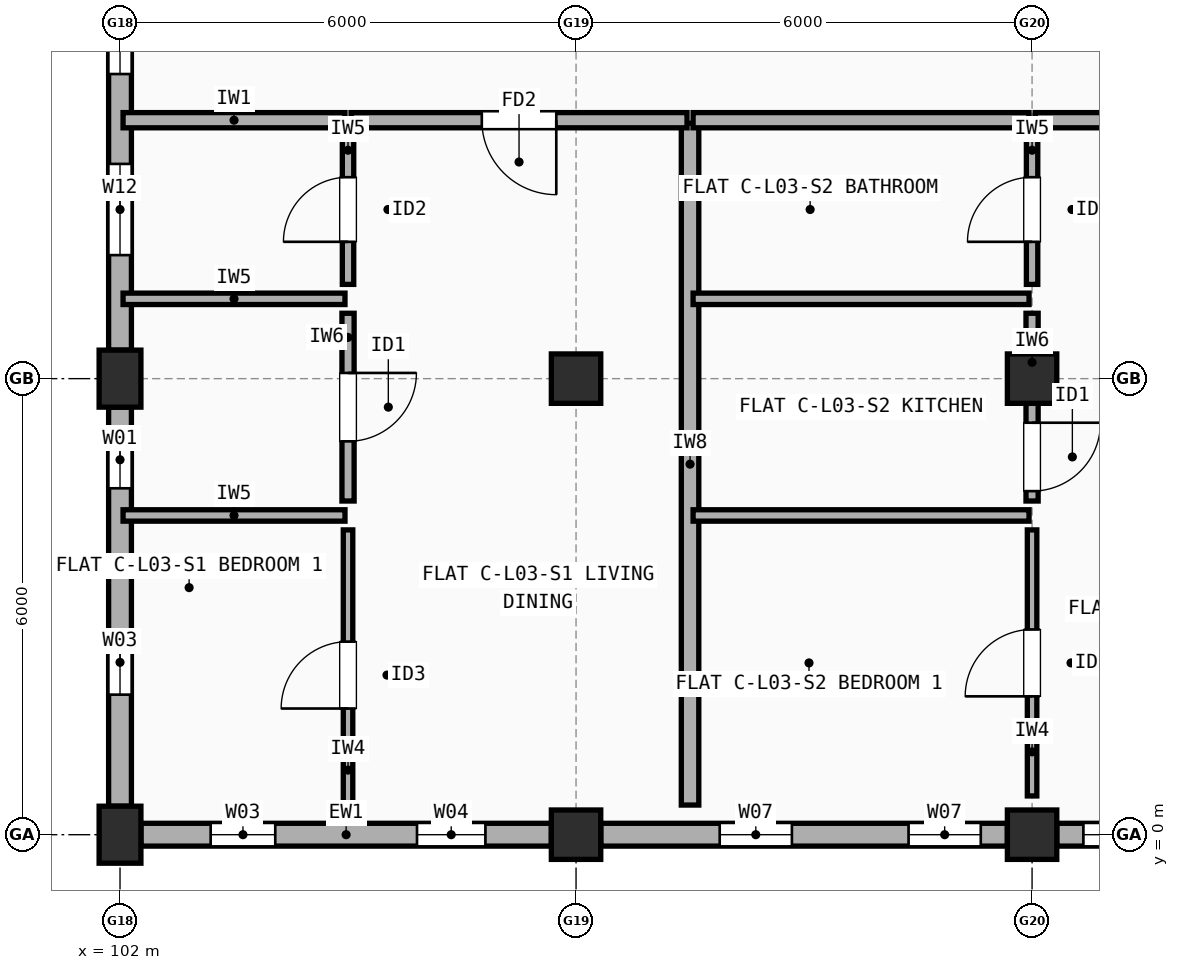
"""IFC4 building model, lengths in metres.
Left out: names, types, materials, properties, quantities, classifications, styles, units other than length and angle.
Written with IfcOpenShell. Run it as: python <this file> out.ifc"""

import sys

from ifc_helpers import new_model, si_unit, direction, frame, frame_2d, origin, origin_2d, place, context, subcontext, project, spatial, rectangle, extrude, element, fill, save


model = new_model("IFC4")
c1 = context("Model", 3, precision=1e-05, world=origin(), true_north=direction((0.0, 1.0)))
c2 = subcontext(c1, "Body", "Model", "MODEL_VIEW")
j1 = project(units=[si_unit("LENGTHUNIT", "METRE"), si_unit("PLANEANGLEUNIT", "RADIAN")], contexts=[c1])
p1 = place(None, origin())
s1 = spatial("IfcSite", under=j1, at=p1, CompositionType="ELEMENT")
p2 = place(p1, origin())
s2 = spatial("IfcBuilding", under=s1, at=p2, CompositionType="ELEMENT")
p3 = place(p2, frame((0.0, 0.0, 10.9)))
s3 = spatial("IfcBuildingStorey", under=s2, at=p3, CompositionType="ELEMENT", Elevation=10.9)
for number, where, z_axis, x_axis in (
    (1, (102.0, 0.0, 0.0), (0.0, 0.0, 1.0), (1.0, 0.0, 0.0)),
    (2, (102.0, 6.0, 0.0), (0.0, 0.0, 1.0), (1.0, 0.0, 0.0)),
):
    element("IfcColumn", number, at=place(p3, frame(where, z_axis=z_axis, x_axis=x_axis)), inside=s3, PredefinedType="COLUMN", context=c2, shape_type="SweptSolid", body=[
        extrude(rectangle(XDim=0.55, YDim=0.75, at=origin_2d()), origin(), (0.0, 0.0, 1.0), 2.96),
    ])
for number, where, z_axis, x_axis in (
    (3, (108.0, 0.0, 0.0), (0.0, 0.0, 1.0), (1.0, 0.0, 0.0)),
    (4, (108.0, 6.0, 0.0), (0.0, 0.0, 1.0), (1.0, 0.0, 0.0)),
    (5, (114.0, 0.0, 0.0), (0.0, 0.0, 1.0), (1.0, 0.0, 0.0)),
    (6, (114.0, 6.0, 0.0), (0.0, 0.0, 1.0), (1.0, 0.0, 0.0)),
):
    element("IfcColumn", number, at=place(p3, frame(where, z_axis=z_axis, x_axis=x_axis)), inside=s3, PredefinedType="COLUMN", context=c2, shape_type="SweptSolid", body=[
        extrude(rectangle(XDim=0.65, YDim=0.65, at=origin_2d()), origin(), (0.0, 0.0, 1.0), 2.96),
    ])
p4 = place(p3, frame((102.275, 0.0, 0.0), z_axis=(0.0, 0.0, 1.0), x_axis=(1.0, 0.0, 0.0)))
e7 = element("IfcWall", 7, at=p4, inside=s3, PredefinedType="STANDARD", context=c2, shape_type="SweptSolid", body=[
    extrude(rectangle(XDim=5.4, YDim=0.3, at=frame_2d((2.7, 0.0))), origin(), (0.0, 0.0, 1.0), 2.442),
])
p5 = place(p4, frame((0.917, 0.0, 0.9)))
e8 = element("IfcOpeningElement", 8, at=p5, cuts=e7, PredefinedType="OPENING", context=c2, shape_type="SweptSolid", body=[
    extrude(rectangle(XDim=0.85, YDim=1.25, at=frame_2d((0.425, 0.625))), frame((0.0, 0.16, 0.0), z_axis=(0.0, -1.0, 0.0), x_axis=(1.0, 0.0, 0.0)), (0.0, 0.0, 1.0), 0.32),
])
p6 = place(p4, frame((3.633, 0.0, 0.9)))
e9 = element("IfcOpeningElement", 9, at=p6, cuts=e7, PredefinedType="OPENING", context=c2, shape_type="SweptSolid", body=[
    extrude(rectangle(XDim=0.9, YDim=1.3, at=frame_2d((0.45, 0.65))), frame((0.0, 0.16, 0.0), z_axis=(0.0, -1.0, 0.0), x_axis=(1.0, 0.0, 0.0)), (0.0, 0.0, 1.0), 0.32),
])
p7 = place(p3, frame((108.325, 0.0, 0.0), z_axis=(0.0, 0.0, 1.0), x_axis=(1.0, 0.0, 0.0)))
e10 = element("IfcWall", 10, at=p7, inside=s3, PredefinedType="STANDARD", context=c2, shape_type="SweptSolid", body=[
    extrude(rectangle(XDim=5.35, YDim=0.3, at=frame_2d((2.675, 0.0))), origin(), (0.0, 0.0, 1.0), 2.442),
])
p8 = place(p7, frame((1.565, 0.0, 0.9)))
e11 = element("IfcOpeningElement", 11, at=p8, cuts=e10, PredefinedType="OPENING", context=c2, shape_type="SweptSolid", body=[
    extrude(rectangle(XDim=0.95, YDim=1.35, at=frame_2d((0.475, 0.675))), frame((0.0, 0.16, 0.0), z_axis=(0.0, -1.0, 0.0), x_axis=(1.0, 0.0, 0.0)), (0.0, 0.0, 1.0), 0.32),
])
p9 = place(p7, frame((4.05, 0.0, 0.9)))
e12 = element("IfcOpeningElement", 12, at=p9, cuts=e10, PredefinedType="OPENING", context=c2, shape_type="SweptSolid", body=[
    extrude(rectangle(XDim=0.95, YDim=1.35, at=frame_2d((0.475, 0.675))), frame((0.0, 0.16, 0.0), z_axis=(0.0, -1.0, 0.0), x_axis=(1.0, 0.0, 0.0)), (0.0, 0.0, 1.0), 0.32),
])
p10 = place(p3, frame((114.325, 0.0, 0.0), z_axis=(0.0, 0.0, 1.0), x_axis=(1.0, 0.0, 0.0)))
e13 = element("IfcWall", 13, at=p10, inside=s3, PredefinedType="STANDARD", context=c2, shape_type="SweptSolid", body=[
    extrude(rectangle(XDim=5.35, YDim=0.3, at=frame_2d((2.675, 0.0))), origin(), (0.0, 0.0, 1.0), 2.442),
])
p11 = place(p10, frame((0.35, 0.0, 0.9)))
e14 = element("IfcOpeningElement", 14, at=p11, cuts=e13, PredefinedType="OPENING", context=c2, shape_type="SweptSolid", body=[
    extrude(rectangle(XDim=1.2, YDim=1.35, at=frame_2d((0.6, 0.675))), frame((0.0, 0.16, 0.0), z_axis=(0.0, -1.0, 0.0), x_axis=(1.0, 0.0, 0.0)), (0.0, 0.0, 1.0), 0.32),
])
p12 = place(p10, frame((2.585, 0.0, 0.9)))
e15 = element("IfcOpeningElement", 15, at=p12, cuts=e13, PredefinedType="OPENING", context=c2, shape_type="SweptSolid", body=[
    extrude(rectangle(XDim=1.2, YDim=1.35, at=frame_2d((0.6, 0.675))), frame((0.0, 0.16, 0.0), z_axis=(0.0, -1.0, 0.0), x_axis=(1.0, 0.0, 0.0)), (0.0, 0.0, 1.0), 0.32),
])
p13 = place(p3, frame((102.0, 11.625, 0.0), z_axis=(0.0, 0.0, 1.0), x_axis=(0.0, -1.0, 0.0)))
e16 = element("IfcWall", 16, at=p13, inside=s3, PredefinedType="STANDARD", context=c2, shape_type="SweptSolid", body=[
    extrude(rectangle(XDim=5.25, YDim=0.3, at=frame_2d((2.625, 0.0))), origin(), (0.0, 0.0, 1.0), 2.442),
])
p14 = place(p13, frame((0.567, 0.0, 0.9)))
e17 = element("IfcOpeningElement", 17, at=p14, cuts=e16, PredefinedType="OPENING", context=c2, shape_type="SweptSolid", body=[
    extrude(rectangle(XDim=1.05, YDim=1.35, at=frame_2d((0.525, 0.675))), frame((0.0, 0.16, 0.0), z_axis=(0.0, -1.0, 0.0), x_axis=(1.0, 0.0, 0.0)), (0.0, 0.0, 1.0), 0.32),
])
p15 = place(p13, frame((2.8, 0.0, 0.9)))
e18 = element("IfcOpeningElement", 18, at=p15, cuts=e16, PredefinedType="OPENING", context=c2, shape_type="SweptSolid", body=[
    extrude(rectangle(XDim=1.2, YDim=1.35, at=frame_2d((0.6, 0.675))), frame((0.0, 0.16, 0.0), z_axis=(0.0, -1.0, 0.0), x_axis=(1.0, 0.0, 0.0)), (0.0, 0.0, 1.0), 0.32),
])
p16 = place(p3, frame((102.0, 5.625, 0.0), z_axis=(0.0, 0.0, 1.0), x_axis=(0.0, -1.0, 0.0)))
e19 = element("IfcWall", 19, at=p16, inside=s3, PredefinedType="STANDARD", context=c2, shape_type="SweptSolid", body=[
    extrude(rectangle(XDim=5.25, YDim=0.3, at=frame_2d((2.625, 0.0))), origin(), (0.0, 0.0, 1.0), 2.442),
])
p17 = place(p16, frame((0.317, 0.0, 0.9)))
e20 = element("IfcOpeningElement", 20, at=p17, cuts=e19, PredefinedType="OPENING", context=c2, shape_type="SweptSolid", body=[
    extrude(rectangle(XDim=0.75, YDim=1.15, at=frame_2d((0.375, 0.575))), frame((0.0, 0.16, 0.0), z_axis=(0.0, -1.0, 0.0), x_axis=(1.0, 0.0, 0.0)), (0.0, 0.0, 1.0), 0.32),
])
p18 = place(p16, frame((2.933, 0.0, 0.9)))
e21 = element("IfcOpeningElement", 21, at=p18, cuts=e19, PredefinedType="OPENING", context=c2, shape_type="SweptSolid", body=[
    extrude(rectangle(XDim=0.85, YDim=1.25, at=frame_2d((0.425, 0.625))), frame((0.0, 0.16, 0.0), z_axis=(0.0, -1.0, 0.0), x_axis=(1.0, 0.0, 0.0)), (0.0, 0.0, 1.0), 0.32),
])
p19 = place(p3, frame((109.5, 0.39, 0.0), z_axis=(0.0, 0.0, 1.0), x_axis=(0.0, 1.0, 0.0)))
e22 = element("IfcWall", 22, at=p19, inside=s3, PredefinedType="SOLIDWALL", context=c2, shape_type="SweptSolid", body=[
    extrude(rectangle(XDim=8.97, YDim=0.23, at=frame_2d((4.485, 0.0))), origin(), (0.0, 0.0, 1.0), 2.442),
])
p20 = place(p3, frame((102.04, 9.4, 0.0), z_axis=(0.0, 0.0, 1.0), x_axis=(1.0, 0.0, 0.0)))
e23 = element("IfcWall", 23, at=p20, inside=s3, PredefinedType="SOLIDWALL", context=c2, shape_type="SweptSolid", body=[
    extrude(rectangle(XDim=2.92, YDim=0.2, at=frame_2d((1.46, 0.0))), origin(), (0.0, 0.0, 1.0), 2.442),
])
p21 = place(p3, frame((105.04, 9.4, 0.0), z_axis=(0.0, 0.0, 1.0), x_axis=(1.0, 0.0, 0.0)))
e24 = element("IfcWall", 24, at=p21, inside=s3, PredefinedType="SOLIDWALL", context=c2, shape_type="SweptSolid", body=[
    extrude(rectangle(XDim=4.42, YDim=0.2, at=frame_2d((2.21, 0.0))), origin(), (0.0, 0.0, 1.0), 2.458),
])
p22 = place(p21, frame((1.72, 0.0, 0.0)))
e25 = element("IfcOpeningElement", 25, at=p22, cuts=e24, PredefinedType="OPENING", context=c2, shape_type="SweptSolid", body=[
    extrude(rectangle(XDim=0.98, YDim=2.15, at=frame_2d((0.49, 1.075))), frame((0.0, 0.11, 0.0), z_axis=(0.0, -1.0, 0.0), x_axis=(1.0, 0.0, 0.0)), (0.0, 0.0, 1.0), 0.22),
])
p23 = place(p3, frame((105.0, 0.19, 0.0), z_axis=(0.0, 0.0, 1.0), x_axis=(0.0, 1.0, 0.0)))
e26 = element("IfcWall", 26, at=p23, inside=s3, PredefinedType="PARTITIONING", context=c2, shape_type="SweptSolid", body=[
    extrude(rectangle(XDim=3.82, YDim=0.125, at=frame_2d((1.91, 0.0))), origin(), (0.0, 0.0, 1.0), 2.96),
])
p24 = place(p23, frame((1.47, 0.0, 0.0)))
e27 = element("IfcOpeningElement", 27, at=p24, cuts=e26, PredefinedType="OPENING", context=c2, shape_type="SweptSolid", body=[
    extrude(rectangle(XDim=0.88, YDim=2.1, at=frame_2d((0.44, 1.05))), frame((0.0, 0.073, 0.0), z_axis=(0.0, -1.0, 0.0), x_axis=(1.0, 0.0, 0.0)), (0.0, 0.0, 1.0), 0.145),
])
p25 = place(p3, frame((105.0, 4.39, 0.0), z_axis=(0.0, 0.0, 1.0), x_axis=(0.0, 1.0, 0.0)))
e28 = element("IfcWall", 28, at=p25, inside=s3, PredefinedType="PLUMBINGWALL", context=c2, shape_type="SweptSolid", body=[
    extrude(rectangle(XDim=2.47, YDim=0.16, at=frame_2d((1.235, 0.0))), origin(), (0.0, 0.0, 1.0), 2.442),
])
p26 = place(p25, frame((0.785, 0.0, 0.0)))
e29 = element("IfcOpeningElement", 29, at=p26, cuts=e28, PredefinedType="OPENING", context=c2, shape_type="SweptSolid", body=[
    extrude(rectangle(XDim=0.9, YDim=2.1, at=frame_2d((0.45, 1.05))), frame((0.0, 0.09, 0.0), z_axis=(0.0, -1.0, 0.0), x_axis=(1.0, 0.0, 0.0)), (0.0, 0.0, 1.0), 0.18),
])
p27 = place(p3, frame((105.0, 7.24, 0.0), z_axis=(0.0, 0.0, 1.0), x_axis=(0.0, 1.0, 0.0)))
e30 = element("IfcWall", 30, at=p27, inside=s3, PredefinedType="PARTITIONING", context=c2, shape_type="SweptSolid", body=[
    extrude(rectangle(XDim=1.97, YDim=0.15, at=frame_2d((0.985, 0.0))), origin(), (0.0, 0.0, 1.0), 2.96),
])
p28 = place(p27, frame((0.56, 0.0, 0.0)))
e31 = element("IfcOpeningElement", 31, at=p28, cuts=e30, PredefinedType="OPENING", context=c2, shape_type="SweptSolid", body=[
    extrude(rectangle(XDim=0.85, YDim=2.1, at=frame_2d((0.425, 1.05))), frame((0.0, 0.085, 0.0), z_axis=(0.0, -1.0, 0.0), x_axis=(1.0, 0.0, 0.0)), (0.0, 0.0, 1.0), 0.17),
])
for number, where, z_axis, x_axis in (
    (32, (102.04, 4.2, 0.0), (0.0, 0.0, 1.0), (1.0, 0.0, 0.0)),
    (33, (102.04, 7.05, 0.0), (0.0, 0.0, 1.0), (1.0, 0.0, 0.0)),
):
    element("IfcWall", number, at=place(p3, frame(where, z_axis=z_axis, x_axis=x_axis)), inside=s3, PredefinedType="PARTITIONING", context=c2, shape_type="SweptSolid", body=[
        extrude(rectangle(XDim=2.92, YDim=0.15, at=frame_2d((1.46, 0.0))), origin(), (0.0, 0.0, 1.0), 2.442),
    ])
p29 = place(p3, frame((109.54, 9.4, 0.0), z_axis=(0.0, 0.0, 1.0), x_axis=(1.0, 0.0, 0.0)))
e34 = element("IfcWall", 34, at=p29, inside=s3, PredefinedType="SOLIDWALL", context=c2, shape_type="SweptSolid", body=[
    extrude(rectangle(XDim=4.42, YDim=0.2, at=frame_2d((2.21, 0.0))), origin(), (0.0, 0.0, 1.0), 2.548),
])
p30 = place(p3, frame((114.04, 9.4, 0.0), z_axis=(0.0, 0.0, 1.0), x_axis=(1.0, 0.0, 0.0)))
e35 = element("IfcWall", 35, at=p30, inside=s3, PredefinedType="SOLIDWALL", context=c2, shape_type="SweptSolid", body=[
    extrude(rectangle(XDim=4.42, YDim=0.2, at=frame_2d((2.21, 0.0))), origin(), (0.0, 0.0, 1.0), 2.548),
])
p31 = place(p30, frame((1.685, 0.0, 0.0)))
e36 = element("IfcOpeningElement", 36, at=p31, cuts=e35, PredefinedType="OPENING", context=c2, shape_type="SweptSolid", body=[
    extrude(rectangle(XDim=1.05, YDim=2.15, at=frame_2d((0.525, 1.075))), frame((0.0, 0.11, 0.0), z_axis=(0.0, -1.0, 0.0), x_axis=(1.0, 0.0, 0.0)), (0.0, 0.0, 1.0), 0.22),
])
p32 = place(p3, frame((114.0, 0.51, 0.0), z_axis=(0.0, 0.0, 1.0), x_axis=(0.0, 1.0, 0.0)))
e37 = element("IfcWall", 37, at=p32, inside=s3, PredefinedType="PARTITIONING", context=c2, shape_type="SweptSolid", body=[
    extrude(rectangle(XDim=3.5, YDim=0.125, at=frame_2d((1.75, 0.0))), origin(), (0.0, 0.0, 1.0), 2.458),
])
p33 = place(p32, frame((1.31, 0.0, 0.0)))
e38 = element("IfcOpeningElement", 38, at=p33, cuts=e37, PredefinedType="OPENING", context=c2, shape_type="SweptSolid", body=[
    extrude(rectangle(XDim=0.88, YDim=2.1, at=frame_2d((0.44, 1.05))), frame((0.0, 0.073, 0.0), z_axis=(0.0, -1.0, 0.0), x_axis=(1.0, 0.0, 0.0)), (0.0, 0.0, 1.0), 0.145),
])
p34 = place(p3, frame((114.0, 4.39, 0.0), z_axis=(0.0, 0.0, 1.0), x_axis=(0.0, 1.0, 0.0)))
e39 = element("IfcWall", 39, at=p34, inside=s3, PredefinedType="PLUMBINGWALL", context=c2, shape_type="SweptSolid", body=[
    extrude(rectangle(XDim=2.47, YDim=0.16, at=frame_2d((1.235, 0.0))), origin(), (0.0, 0.0, 1.0), 2.458),
])
p35 = place(p34, frame((0.13, 0.0, 0.0)))
e40 = element("IfcOpeningElement", 40, at=p35, cuts=e39, PredefinedType="OPENING", context=c2, shape_type="SweptSolid", body=[
    extrude(rectangle(XDim=0.9, YDim=2.1, at=frame_2d((0.45, 1.05))), frame((0.0, 0.09, 0.0), z_axis=(0.0, -1.0, 0.0), x_axis=(1.0, 0.0, 0.0)), (0.0, 0.0, 1.0), 0.18),
])
p36 = place(p3, frame((114.0, 7.24, 0.0), z_axis=(0.0, 0.0, 1.0), x_axis=(0.0, 1.0, 0.0)))
e41 = element("IfcWall", 41, at=p36, inside=s3, PredefinedType="PARTITIONING", context=c2, shape_type="SweptSolid", body=[
    extrude(rectangle(XDim=1.97, YDim=0.15, at=frame_2d((0.985, 0.0))), origin(), (0.0, 0.0, 1.0), 2.548),
])
p37 = place(p36, frame((0.56, 0.0, 0.0)))
e42 = element("IfcOpeningElement", 42, at=p37, cuts=e41, PredefinedType="OPENING", context=c2, shape_type="SweptSolid", body=[
    extrude(rectangle(XDim=0.85, YDim=2.1, at=frame_2d((0.425, 1.05))), frame((0.0, 0.085, 0.0), z_axis=(0.0, -1.0, 0.0), x_axis=(1.0, 0.0, 0.0)), (0.0, 0.0, 1.0), 0.17),
])
p38 = place(p3, frame((109.54, 4.2, 0.0), z_axis=(0.0, 0.0, 1.0), x_axis=(1.0, 0.0, 0.0)))
e43 = element("IfcWall", 43, at=p38, inside=s3, PredefinedType="PARTITIONING", context=c2, shape_type="SweptSolid", body=[
    extrude(rectangle(XDim=4.42, YDim=0.15, at=frame_2d((2.21, 0.0))), origin(), (0.0, 0.0, 1.0), 2.458),
])
p39 = place(p3, frame((109.54, 7.05, 0.0), z_axis=(0.0, 0.0, 1.0), x_axis=(1.0, 0.0, 0.0)))
e44 = element("IfcWall", 44, at=p39, inside=s3, PredefinedType="PARTITIONING", context=c2, shape_type="SweptSolid", body=[
    extrude(rectangle(XDim=4.42, YDim=0.15, at=frame_2d((2.21, 0.0))), origin(), (0.0, 0.0, 1.0), 2.548),
])
p40 = place(p5, origin())
e45 = element("IfcWindow", 45, at=p40, inside=s3, PartitioningType="SINGLE_PANEL", PredefinedType="WINDOW", context=c2, shape_type="SweptSolid", body=[
    extrude(rectangle(XDim=0.85, YDim=1.25, at=frame_2d((0.425, 0.625))), frame((0.0, 0.03, 0.0), z_axis=(0.0, -1.0, 0.0), x_axis=(1.0, 0.0, 0.0)), (0.0, 0.0, 1.0), 0.06),
])
fill(e8, e45)
p41 = place(p6, origin())
e46 = element("IfcWindow", 46, at=p41, inside=s3, PartitioningType="SINGLE_PANEL", PredefinedType="WINDOW", context=c2, shape_type="SweptSolid", body=[
    extrude(rectangle(XDim=0.9, YDim=1.3, at=frame_2d((0.45, 0.65))), frame((0.0, 0.03, 0.0), z_axis=(0.0, -1.0, 0.0), x_axis=(1.0, 0.0, 0.0)), (0.0, 0.0, 1.0), 0.06),
])
fill(e9, e46)
p42 = place(p8, origin())
e47 = element("IfcWindow", 47, at=p42, inside=s3, PartitioningType="SINGLE_PANEL", PredefinedType="WINDOW", context=c2, shape_type="SweptSolid", body=[
    extrude(rectangle(XDim=0.95, YDim=1.35, at=frame_2d((0.475, 0.675))), frame((0.0, 0.03, 0.0), z_axis=(0.0, -1.0, 0.0), x_axis=(1.0, 0.0, 0.0)), (0.0, 0.0, 1.0), 0.06),
])
fill(e11, e47)
p43 = place(p9, origin())
e48 = element("IfcWindow", 48, at=p43, inside=s3, PartitioningType="SINGLE_PANEL", PredefinedType="WINDOW", context=c2, shape_type="SweptSolid", body=[
    extrude(rectangle(XDim=0.95, YDim=1.35, at=frame_2d((0.475, 0.675))), frame((0.0, 0.03, 0.0), z_axis=(0.0, -1.0, 0.0), x_axis=(1.0, 0.0, 0.0)), (0.0, 0.0, 1.0), 0.06),
])
fill(e12, e48)
p44 = place(p11, origin())
e49 = element("IfcWindow", 49, at=p44, inside=s3, PartitioningType="SINGLE_PANEL", PredefinedType="WINDOW", context=c2, shape_type="SweptSolid", body=[
    extrude(rectangle(XDim=1.2, YDim=1.35, at=frame_2d((0.6, 0.675))), frame((0.0, 0.03, 0.0), z_axis=(0.0, -1.0, 0.0), x_axis=(1.0, 0.0, 0.0)), (0.0, 0.0, 1.0), 0.06),
])
fill(e14, e49)
p45 = place(p14, origin())
e50 = element("IfcWindow", 50, at=p45, inside=s3, PartitioningType="SINGLE_PANEL", PredefinedType="WINDOW", context=c2, shape_type="SweptSolid", body=[
    extrude(rectangle(XDim=1.05, YDim=1.35, at=frame_2d((0.525, 0.675))), frame((0.0, 0.03, 0.0), z_axis=(0.0, -1.0, 0.0), x_axis=(1.0, 0.0, 0.0)), (0.0, 0.0, 1.0), 0.06),
])
fill(e17, e50)
p46 = place(p15, origin())
e51 = element("IfcWindow", 51, at=p46, inside=s3, PartitioningType="SINGLE_PANEL", PredefinedType="WINDOW", context=c2, shape_type="SweptSolid", body=[
    extrude(rectangle(XDim=1.2, YDim=1.35, at=frame_2d((0.6, 0.675))), frame((0.0, 0.03, 0.0), z_axis=(0.0, -1.0, 0.0), x_axis=(1.0, 0.0, 0.0)), (0.0, 0.0, 1.0), 0.06),
])
fill(e18, e51)
p47 = place(p17, origin())
e52 = element("IfcWindow", 52, at=p47, inside=s3, PartitioningType="SINGLE_PANEL", PredefinedType="WINDOW", context=c2, shape_type="SweptSolid", body=[
    extrude(rectangle(XDim=0.75, YDim=1.15, at=frame_2d((0.375, 0.575))), frame((0.0, 0.03, 0.0), z_axis=(0.0, -1.0, 0.0), x_axis=(1.0, 0.0, 0.0)), (0.0, 0.0, 1.0), 0.06),
])
fill(e20, e52)
p48 = place(p18, origin())
e53 = element("IfcWindow", 53, at=p48, inside=s3, PartitioningType="SINGLE_PANEL", PredefinedType="WINDOW", context=c2, shape_type="SweptSolid", body=[
    extrude(rectangle(XDim=0.85, YDim=1.25, at=frame_2d((0.425, 0.625))), frame((0.0, 0.03, 0.0), z_axis=(0.0, -1.0, 0.0), x_axis=(1.0, 0.0, 0.0)), (0.0, 0.0, 1.0), 0.06),
])
fill(e21, e53)
p49 = place(p22, origin())
e54 = element("IfcDoor", 54, at=p49, inside=s3, OperationType="SINGLE_SWING_RIGHT", PredefinedType="DOOR", context=c2, shape_type="SweptSolid", body=[
    extrude(rectangle(XDim=0.98, YDim=2.15, at=frame_2d((0.49, 1.075))), frame((0.0, 0.025, 0.0), z_axis=(0.0, -1.0, 0.0), x_axis=(1.0, 0.0, 0.0)), (0.0, 0.0, 1.0), 0.05),
])
fill(e25, e54)
p50 = place(p24, origin())
e55 = element("IfcDoor", 55, at=p50, inside=s3, OperationType="SINGLE_SWING_LEFT", PredefinedType="DOOR", context=c2, shape_type="SweptSolid", body=[
    extrude(rectangle(XDim=0.88, YDim=2.1, at=frame_2d((0.44, 1.05))), frame((0.0, 0.025, 0.0), z_axis=(0.0, -1.0, 0.0), x_axis=(1.0, 0.0, 0.0)), (0.0, 0.0, 1.0), 0.05),
])
fill(e27, e55)
p51 = place(p26, origin())
e56 = element("IfcDoor", 56, at=p51, inside=s3, OperationType="SINGLE_SWING_RIGHT", PredefinedType="DOOR", context=c2, shape_type="SweptSolid", body=[
    extrude(rectangle(XDim=0.9, YDim=2.1, at=frame_2d((0.45, 1.05))), frame((0.0, 0.025, 0.0), z_axis=(0.0, -1.0, 0.0), x_axis=(1.0, 0.0, 0.0)), (0.0, 0.0, 1.0), 0.05),
])
fill(e29, e56)
p52 = place(p28, origin())
e57 = element("IfcDoor", 57, at=p52, inside=s3, OperationType="SINGLE_SWING_LEFT", PredefinedType="DOOR", context=c2, shape_type="SweptSolid", body=[
    extrude(rectangle(XDim=0.85, YDim=2.1, at=frame_2d((0.425, 1.05))), frame((0.0, 0.025, 0.0), z_axis=(0.0, -1.0, 0.0), x_axis=(1.0, 0.0, 0.0)), (0.0, 0.0, 1.0), 0.05),
])
fill(e31, e57)
p53 = place(p33, origin())
e58 = element("IfcDoor", 58, at=p53, inside=s3, OperationType="SINGLE_SWING_LEFT", PredefinedType="DOOR", context=c2, shape_type="SweptSolid", body=[
    extrude(rectangle(XDim=0.88, YDim=2.1, at=frame_2d((0.44, 1.05))), frame((0.0, 0.025, 0.0), z_axis=(0.0, -1.0, 0.0), x_axis=(1.0, 0.0, 0.0)), (0.0, 0.0, 1.0), 0.05),
])
fill(e38, e58)
p54 = place(p35, origin())
e59 = element("IfcDoor", 59, at=p54, inside=s3, OperationType="SINGLE_SWING_RIGHT", PredefinedType="DOOR", context=c2, shape_type="SweptSolid", body=[
    extrude(rectangle(XDim=0.9, YDim=2.1, at=frame_2d((0.45, 1.05))), frame((0.0, 0.025, 0.0), z_axis=(0.0, -1.0, 0.0), x_axis=(1.0, 0.0, 0.0)), (0.0, 0.0, 1.0), 0.05),
])
fill(e40, e59)
p55 = place(p37, origin())
e60 = element("IfcDoor", 60, at=p55, inside=s3, OperationType="SINGLE_SWING_LEFT", PredefinedType="DOOR", context=c2, shape_type="SweptSolid", body=[
    extrude(rectangle(XDim=0.85, YDim=2.1, at=frame_2d((0.425, 1.05))), frame((0.0, 0.025, 0.0), z_axis=(0.0, -1.0, 0.0), x_axis=(1.0, 0.0, 0.0)), (0.0, 0.0, 1.0), 0.05),
])
fill(e42, e60)
save(model, sys.argv[1])
